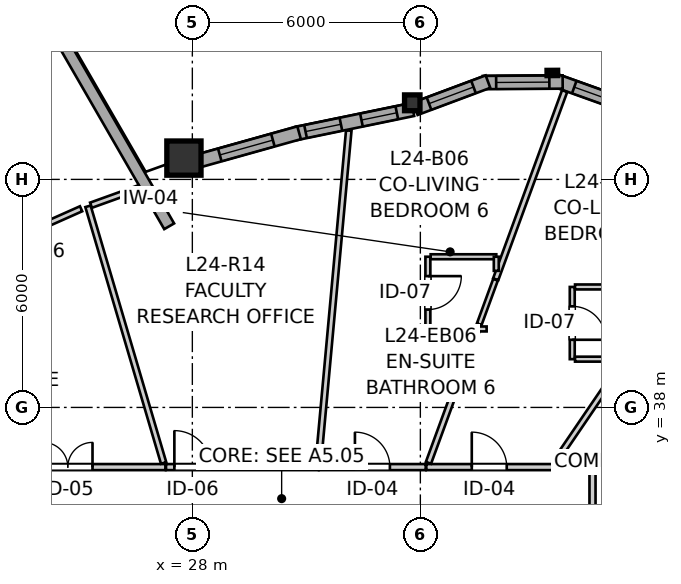
"""IFC4 building model, lengths in metres.
Left out: names, types, materials, properties, quantities, classifications, styles, units other than length and angle.
Written with IfcOpenShell. Run it as: python <this file> out.ifc"""

import sys

from ifc_helpers import new_model, si_unit, direction, frame, frame_2d, origin, origin_2d, place, context, subcontext, project, spatial, rectangle, i_section, extrude, source, transform, mapped, element, fill, save


model = new_model("IFC4")
c1 = context("Model", 3, precision=1e-05, world=origin(), true_north=direction((0.0, 1.0)))
c2 = subcontext(c1, "Body", "Model", "MODEL_VIEW")
j1 = project(units=[si_unit("LENGTHUNIT", "METRE"), si_unit("PLANEANGLEUNIT", "RADIAN")], contexts=[c1])
p1 = place(None, origin())
s1 = spatial("IfcSite", under=j1, at=p1, CompositionType="ELEMENT")
p2 = place(p1, origin())
s2 = spatial("IfcBuilding", under=s1, at=p2, CompositionType="ELEMENT")
p3 = place(p2, frame((0.0, 0.0, 83.2)))
s3 = spatial("IfcBuildingStorey", under=s2, at=p3, CompositionType="ELEMENT", Elevation=83.2)
m1 = source(origin(), c2, "Body", "SweptSolid", [
    extrude(i_section(OverallWidth=0.406, OverallDepth=0.416, WebThickness=0.027, FlangeThickness=0.044, FilletRadius=0.015, at=origin_2d()), origin(), (0.0, 0.0, 1.0), 2.935),
])
p4 = place(p3, frame((33.787, 46.015, 0.0), z_axis=(0.0, 0.0, 1.0), x_axis=(1.0, 0.0, 0.0)))
e1 = element("IfcColumn", 1, at=p4, inside=s3, PredefinedType="PILASTER", context=c2, shape_type="MappedRepresentation", body=[
    mapped(m1, transform((0.0, 0.0, 0.0), x_axis=(1.0, 0.0, 0.0), y_axis=(0.0, 1.0, 0.0), z_axis=(0.0, 0.0, 1.0), scale=1.0)),
])
m2 = source(origin(), c2, "Body", "SweptSolid", [
    extrude(rectangle(XDim=0.9, YDim=0.9, at=origin_2d()), origin(), (0.0, 0.0, 1.0), 2.935),
])
p5 = place(p3, frame((27.779, 44.561, 0.0), z_axis=(0.0, 0.0, 1.0), x_axis=(1.0, 0.0, 0.0)))
e2 = element("IfcColumn", 2, at=p5, inside=s3, PredefinedType="COLUMN", context=c2, shape_type="MappedRepresentation", body=[
    mapped(m2, transform((0.0, 0.0, 0.0), x_axis=(1.0, 0.0, 0.0), y_axis=(0.0, 1.0, 0.0), z_axis=(0.0, 0.0, 1.0), scale=1.0)),
])
p6 = place(p3, frame((39.586, 45.877, 0.0), z_axis=(0.0, 0.0, 1.0), x_axis=(-0.941473186867, 0.33708787936, 0.0)))
e3 = element("IfcWall", 3, at=p6, inside=s3, PredefinedType="SOLIDWALL", context=c2, shape_type="SweptSolid", body=[
    extrude(rectangle(XDim=2.099, YDim=0.35, at=frame_2d((1.049, 0.0))), origin(), (0.0, 0.0, 1.0), 2.465),
])
p7 = place(p6, frame((0.283, 0.0, 0.82)))
e4 = element("IfcOpeningElement", 4, at=p7, cuts=e3, PredefinedType="OPENING", context=c2, shape_type="SweptSolid", body=[
    extrude(rectangle(XDim=1.35, YDim=1.45, at=frame_2d((0.675, 0.725))), frame((0.0, 0.185, 0.0), z_axis=(0.0, -1.0, 0.0), x_axis=(1.0, 0.0, 0.0)), (0.0, 0.0, 1.0), 0.37),
])
p8 = place(p3, frame((37.744, 46.562, 0.0), z_axis=(0.0, 0.0, 1.0), x_axis=(-0.999976451414, -0.006862697526, 0.0)))
e5 = element("IfcWall", 5, at=p8, inside=s3, PredefinedType="SOLIDWALL", context=c2, shape_type="SweptSolid", body=[
    extrude(rectangle(XDim=2.099, YDim=0.35, at=frame_2d((1.049, 0.0))), origin(), (0.0, 0.0, 1.0), 2.465),
])
p9 = place(p8, frame((0.35, 0.0, 0.82)))
e6 = element("IfcOpeningElement", 6, at=p9, cuts=e5, PredefinedType="OPENING", context=c2, shape_type="SweptSolid", body=[
    extrude(rectangle(XDim=1.4, YDim=1.35, at=frame_2d((0.7, 0.675))), frame((0.0, 0.185, 0.0), z_axis=(0.0, -1.0, 0.0), x_axis=(1.0, 0.0, 0.0)), (0.0, 0.0, 1.0), 0.37),
])
p10 = place(p3, frame((35.779, 46.573, 0.0), z_axis=(0.0, 0.0, 1.0), x_axis=(-0.9368002254, -0.349864741994, 0.0)))
e7 = element("IfcWall", 7, at=p10, inside=s3, PredefinedType="SOLIDWALL", context=c2, shape_type="SweptSolid", body=[
    extrude(rectangle(XDim=2.041, YDim=0.35, at=frame_2d((1.021, 0.0))), origin(), (0.0, 0.0, 1.0), 2.465),
])
p11 = place(p10, frame((0.406, 0.0, 0.82)))
e8 = element("IfcOpeningElement", 8, at=p11, cuts=e7, PredefinedType="OPENING", context=c2, shape_type="SweptSolid", body=[
    extrude(rectangle(XDim=1.25, YDim=1.35, at=frame_2d((0.625, 0.675))), frame((0.0, 0.185, 0.0), z_axis=(0.0, -1.0, 0.0), x_axis=(1.0, 0.0, 0.0)), (0.0, 0.0, 1.0), 0.37),
])
p12 = place(p3, frame((33.803, 45.84, 0.0), z_axis=(0.0, 0.0, 1.0), x_axis=(-0.97943222174, -0.201773444777, 0.0)))
e9 = element("IfcWall", 9, at=p12, inside=s3, PredefinedType="SOLIDWALL", context=c2, shape_type="SweptSolid", body=[
    extrude(rectangle(XDim=3.144, YDim=0.35, at=frame_2d((1.572, 0.0))), origin(), (0.0, 0.0, 1.0), 2.465),
])
p13 = place(p12, frame((0.431, 0.0, 0.82)))
e10 = element("IfcOpeningElement", 10, at=p13, cuts=e9, PredefinedType="OPENING", context=c2, shape_type="SweptSolid", body=[
    extrude(rectangle(XDim=0.95, YDim=1.35, at=frame_2d((0.475, 0.675))), frame((0.0, 0.185, 0.0), z_axis=(0.0, -1.0, 0.0), x_axis=(1.0, 0.0, 0.0)), (0.0, 0.0, 1.0), 0.37),
])
p14 = place(p12, frame((1.933, 0.0, 0.82)))
e11 = element("IfcOpeningElement", 11, at=p14, cuts=e9, PredefinedType="OPENING", context=c2, shape_type="SweptSolid", body=[
    extrude(rectangle(XDim=0.95, YDim=1.35, at=frame_2d((0.475, 0.675))), frame((0.0, 0.185, 0.0), z_axis=(0.0, -1.0, 0.0), x_axis=(1.0, 0.0, 0.0)), (0.0, 0.0, 1.0), 0.37),
])
p15 = place(p3, frame((30.809, 45.227, 0.0), z_axis=(0.0, 0.0, 1.0), x_axis=(-0.963041637143, -0.269352566591, 0.0)))
e12 = element("IfcWall", 12, at=p15, inside=s3, PredefinedType="SOLIDWALL", context=c2, shape_type="SweptSolid", body=[
    extrude(rectangle(XDim=2.873, YDim=0.35, at=frame_2d((1.437, 0.0))), origin(), (0.0, 0.0, 1.0), 2.465),
])
p16 = place(p15, frame((0.717, 0.0, 0.82)))
e13 = element("IfcOpeningElement", 13, at=p16, cuts=e12, PredefinedType="OPENING", context=c2, shape_type="SweptSolid", body=[
    extrude(rectangle(XDim=1.45, YDim=1.25, at=frame_2d((0.725, 0.625))), frame((0.0, 0.185, 0.0), z_axis=(0.0, -1.0, 0.0), x_axis=(1.0, 0.0, 0.0)), (0.0, 0.0, 1.0), 0.37),
])
p17 = place(p3, frame((27.39, 42.766, 0.0), z_axis=(0.0, 0.0, 1.0), x_axis=(-0.499999403898, 0.866025747944, 0.0)))
e14 = element("IfcWall", 14, at=p17, inside=s3, PredefinedType="SOLIDWALL", context=c2, shape_type="SweptSolid", body=[
    extrude(rectangle(XDim=20.603, YDim=0.3, at=frame_2d((10.302, 0.0))), origin(), (0.0, 0.0, 1.0), 2.115),
])
p18 = place(p3, frame((22.17, 36.43, 0.0), z_axis=(0.0, 0.0, 1.0), x_axis=(1.0, 0.0, 0.0)))
e15 = element("IfcWall", 15, at=p18, inside=s3, PredefinedType="PARTITIONING", context=c2, shape_type="SweptSolid", body=[
    extrude(rectangle(XDim=5.122, YDim=0.16, at=frame_2d((2.561, 0.0))), origin(), (0.0, 0.0, 1.0), 2.573),
])
p19 = place(p18, frame((1.903, 0.0, 0.0)))
e16 = element("IfcOpeningElement", 16, at=p19, cuts=e15, PredefinedType="OPENING", context=c2, shape_type="SweptSolid", body=[
    extrude(rectangle(XDim=1.3, YDim=2.1, at=frame_2d((0.65, 1.05))), frame((0.0, 0.09, 0.0), z_axis=(0.0, -1.0, 0.0), x_axis=(1.0, 0.0, 0.0)), (0.0, 0.0, 1.0), 0.18),
])
p20 = place(p3, frame((38.53, 36.43, 0.0), z_axis=(0.0, 0.0, 1.0), x_axis=(0.0, -1.0, 0.0)))
e17 = element("IfcWall", 17, at=p20, inside=s3, PredefinedType="PARTITIONING", context=c2, shape_type="SweptSolid", body=[
    extrude(rectangle(XDim=4.559, YDim=0.16, at=frame_2d((2.279, 0.0))), origin(), (0.0, 0.0, 1.0), 2.573),
])
p21 = place(p20, frame((1.646, 0.0, 0.0)))
e18 = element("IfcOpeningElement", 18, at=p21, cuts=e17, PredefinedType="OPENING", context=c2, shape_type="SweptSolid", body=[
    extrude(rectangle(XDim=1.3, YDim=2.1, at=frame_2d((0.65, 1.05))), frame((0.0, 0.09, 0.0), z_axis=(0.0, -1.0, 0.0), x_axis=(1.0, 0.0, 0.0)), (0.0, 0.0, 1.0), 0.18),
])
p22 = place(p3, frame((27.307, 36.43, 0.0), z_axis=(0.0, 0.0, 1.0), x_axis=(1.0, 0.0, 0.0)))
e19 = element("IfcWall", 19, at=p22, inside=s3, PredefinedType="PARTITIONING", context=c2, shape_type="SweptSolid", body=[
    extrude(rectangle(XDim=4.013, YDim=0.16, at=frame_2d((2.007, 0.0))), origin(), (0.0, 0.0, 1.0), 2.935),
])
p23 = place(p22, frame((0.22, 0.0, 0.0)))
e20 = element("IfcOpeningElement", 20, at=p23, cuts=e19, PredefinedType="OPENING", context=c2, shape_type="SweptSolid", body=[
    extrude(rectangle(XDim=0.96, YDim=2.1, at=frame_2d((0.48, 1.05))), frame((0.0, 0.09, 0.0), z_axis=(0.0, -1.0, 0.0), x_axis=(1.0, 0.0, 0.0)), (0.0, 0.0, 1.0), 0.18),
])
p24 = place(p3, frame((34.156, 36.43, 0.0), z_axis=(0.0, 0.0, 1.0), x_axis=(1.0, 0.0, 0.0)))
e21 = element("IfcWall", 21, at=p24, inside=s3, PredefinedType="PARTITIONING", context=c2, shape_type="SweptSolid", body=[
    extrude(rectangle(XDim=3.316, YDim=0.16, at=frame_2d((1.658, 0.0))), origin(), (0.0, 0.0, 1.0), 2.935),
])
p25 = place(p24, frame((1.197, 0.0, 0.0)))
e22 = element("IfcOpeningElement", 22, at=p25, cuts=e21, PredefinedType="OPENING", context=c2, shape_type="SweptSolid", body=[
    extrude(rectangle(XDim=0.92, YDim=2.1, at=frame_2d((0.46, 1.05))), frame((0.0, 0.09, 0.0), z_axis=(0.0, -1.0, 0.0), x_axis=(1.0, 0.0, 0.0)), (0.0, 0.0, 1.0), 0.18),
])
p26 = place(p3, frame((22.377, 42.026, 0.0), z_axis=(0.0, 0.0, 1.0), x_axis=(0.913387960111, 0.407090204162, 0.0)))
e23 = element("IfcWall", 23, at=p26, inside=s3, PredefinedType="PARTITIONING", context=c2, shape_type="SweptSolid", body=[
    extrude(rectangle(XDim=2.951, YDim=0.145, at=frame_2d((1.475, 0.0))), origin(), (0.0, 0.0, 1.0), 2.453),
])
p27 = place(p26, frame((0.995, 0.0, 0.0)))
e24 = element("IfcOpeningElement", 24, at=p27, cuts=e23, PredefinedType="OPENING", context=c2, shape_type="SweptSolid", body=[
    extrude(rectangle(XDim=0.96, YDim=2.1, at=frame_2d((0.48, 1.05))), frame((0.0, 0.083, 0.0), z_axis=(0.0, -1.0, 0.0), x_axis=(1.0, 0.0, 0.0)), (0.0, 0.0, 1.0), 0.165),
])
p28 = place(p3, frame((31.335, 36.43, 0.0), z_axis=(0.0, 0.0, 1.0), x_axis=(1.0, 0.0, 0.0)))
e25 = element("IfcWall", 25, at=p28, inside=s3, PredefinedType="PARTITIONING", context=c2, shape_type="SweptSolid", body=[
    extrude(rectangle(XDim=2.806, YDim=0.16, at=frame_2d((1.403, 0.0))), origin(), (0.0, 0.0, 1.0), 2.935),
])
p29 = place(p28, frame((0.944, 0.0, 0.0)))
e26 = element("IfcOpeningElement", 26, at=p29, cuts=e25, PredefinedType="OPENING", context=c2, shape_type="SweptSolid", body=[
    extrude(rectangle(XDim=0.92, YDim=2.1, at=frame_2d((0.46, 1.05))), frame((0.0, 0.09, 0.0), z_axis=(0.0, -1.0, 0.0), x_axis=(1.0, 0.0, 0.0)), (0.0, 0.0, 1.0), 0.18),
])
p30 = place(p3, frame((34.198, 41.965, 0.0), z_axis=(0.0, 0.0, 1.0), x_axis=(0.0, -1.0, 0.0)))
e27 = element("IfcWall", 27, at=p30, inside=s3, PredefinedType="PARTITIONING", context=c2, shape_type="SweptSolid", body=[
    extrude(rectangle(XDim=1.827, YDim=0.13, at=frame_2d((0.914, 0.0))), origin(), (0.0, 0.0, 1.0), 2.935),
])
p31 = place(p30, frame((0.51, 0.0, 0.0)))
e28 = element("IfcOpeningElement", 28, at=p31, cuts=e27, PredefinedType="OPENING", context=c2, shape_type="SweptSolid", body=[
    extrude(rectangle(XDim=0.88, YDim=2.05, at=frame_2d((0.44, 1.025))), frame((0.0, 0.075, 0.0), z_axis=(0.0, -1.0, 0.0), x_axis=(1.0, 0.0, 0.0)), (0.0, 0.0, 1.0), 0.15),
])
p32 = place(p3, frame((37.997, 41.17, 0.0), z_axis=(0.0, 0.0, 1.0), x_axis=(0.0, -1.0, 0.0)))
e29 = element("IfcWall", 29, at=p32, inside=s3, PredefinedType="PARTITIONING", context=c2, shape_type="SweptSolid", body=[
    extrude(rectangle(XDim=1.9, YDim=0.13, at=frame_2d((0.95, 0.0))), origin(), (0.0, 0.0, 1.0), 2.935),
])
p33 = place(p32, frame((0.51, 0.0, 0.0)))
e30 = element("IfcOpeningElement", 30, at=p33, cuts=e29, PredefinedType="OPENING", context=c2, shape_type="SweptSolid", body=[
    extrude(rectangle(XDim=0.88, YDim=2.05, at=frame_2d((0.44, 1.025))), frame((0.0, 0.075, 0.0), z_axis=(0.0, -1.0, 0.0), x_axis=(1.0, 0.0, 0.0)), (0.0, 0.0, 1.0), 0.15),
])
p34 = place(p3, frame((31.314, 36.525, 0.0), z_axis=(0.0, 0.0, 1.0), x_axis=(0.091226381691, 0.995830179942, 0.0)))
e31 = element("IfcWall", 31, at=p34, inside=s3, PredefinedType="PARTITIONING", context=c2, shape_type="SweptSolid", body=[
    extrude(rectangle(XDim=8.797, YDim=0.145, at=frame_2d((4.398, 0.0))), origin(), (0.0, 0.0, 1.0), 2.935),
])
p35 = place(p3, frame((25.254, 43.292, 0.0), z_axis=(0.0, 0.0, 1.0), x_axis=(0.282661880608, -0.959219610543, 0.0)))
e32 = element("IfcWall", 32, at=p35, inside=s3, PredefinedType="PARTITIONING", context=c2, shape_type="SweptSolid", body=[
    extrude(rectangle(XDim=7.041, YDim=0.145, at=frame_2d((3.521, 0.0))), origin(), (0.0, 0.0, 1.0), 2.935),
])
p36 = place(p3, frame((38.659, 31.93, 0.0), z_axis=(0.0, 0.0, 1.0), x_axis=(0.813936175568, 0.580954302938, 0.0)))
e33 = element("IfcWall", 33, at=p36, inside=s3, PredefinedType="PARTITIONING", context=c2, shape_type="SweptSolid", body=[
    extrude(rectangle(XDim=6.346, YDim=0.145, at=frame_2d((3.173, 0.0))), origin(), (0.0, 0.0, 1.0), 2.935),
])
p37 = place(p3, frame((35.983, 41.373, 0.0), z_axis=(0.0, 0.0, 1.0), x_axis=(0.343972978133, 0.938979547335, 0.0)))
e34 = element("IfcWall", 34, at=p37, inside=s3, PredefinedType="PARTITIONING", context=c2, shape_type="SweptSolid", body=[
    extrude(rectangle(XDim=5.272, YDim=0.145, at=frame_2d((2.636, 0.0))), origin(), (0.0, 0.0, 1.0), 2.935),
])
p38 = place(p3, frame((34.213, 36.542, 0.0), z_axis=(0.0, 0.0, 1.0), x_axis=(0.343978558693, 0.93897750301, 0.0)))
e35 = element("IfcWall", 35, at=p38, inside=s3, PredefinedType="PARTITIONING", context=c2, shape_type="SweptSolid", body=[
    extrude(rectangle(XDim=3.664, YDim=0.145, at=frame_2d((1.832, 0.0))), origin(), (0.0, 0.0, 1.0), 2.935),
])
p39 = place(p3, frame((37.541, 36.557, 0.0), z_axis=(0.0, 0.0, 1.0), x_axis=(0.563020017907, 0.826443258449, 0.0)))
e36 = element("IfcWall", 36, at=p39, inside=s3, PredefinedType="PARTITIONING", context=c2, shape_type="SweptSolid", body=[
    extrude(rectangle(XDim=3.3, YDim=0.145, at=frame_2d((1.65, 0.0))), origin(), (0.0, 0.0, 1.0), 2.935),
])
p40 = place(p3, frame((38.07, 41.17, 0.0), z_axis=(0.0, 0.0, 1.0), x_axis=(1.0, 0.0, 0.0)))
e37 = element("IfcWall", 37, at=p40, inside=s3, PredefinedType="PARTITIONING", context=c2, shape_type="SweptSolid", body=[
    extrude(rectangle(XDim=1.727, YDim=0.13, at=frame_2d((0.864, 0.0))), origin(), (0.0, 0.0, 1.0), 2.935),
])
p41 = place(p3, frame((34.271, 41.965, 0.0), z_axis=(0.0, 0.0, 1.0), x_axis=(1.0, 0.0, 0.0)))
e38 = element("IfcWall", 38, at=p41, inside=s3, PredefinedType="PARTITIONING", context=c2, shape_type="SweptSolid", body=[
    extrude(rectangle(XDim=1.727, YDim=0.13, at=frame_2d((0.864, 0.0))), origin(), (0.0, 0.0, 1.0), 2.103),
])
p42 = place(p3, frame((38.07, 39.27, 0.0), z_axis=(0.0, 0.0, 1.0), x_axis=(1.0, 0.0, 0.0)))
e39 = element("IfcWall", 39, at=p42, inside=s3, PredefinedType="PARTITIONING", context=c2, shape_type="SweptSolid", body=[
    extrude(rectangle(XDim=1.179, YDim=0.13, at=frame_2d((0.589, 0.0))), origin(), (0.0, 0.0, 1.0), 2.935),
])
p43 = place(p3, frame((35.549, 40.189, 0.0), z_axis=(0.0, 0.0, 1.0), x_axis=(0.344070409158, 0.938943850048, 0.0)))
e40 = element("IfcWall", 40, at=p43, inside=s3, PredefinedType="PARTITIONING", context=c2, shape_type="SweptSolid", body=[
    extrude(rectangle(XDim=1.246, YDim=0.13, at=frame_2d((0.623, 0.0))), origin(), (0.0, 0.0, 1.0), 2.935),
])
p44 = place(p3, frame((25.334, 43.321, 0.0), z_axis=(0.0, 0.0, 1.0), x_axis=(0.940956330278, 0.3385279671, 0.0)))
e41 = element("IfcWall", 41, at=p44, inside=s3, PredefinedType="PARTITIONING", context=c2, shape_type="SweptSolid", body=[
    extrude(rectangle(XDim=1.354, YDim=0.145, at=frame_2d((0.677, 0.0))), origin(), (0.0, 0.0, 1.0), 2.453),
])
p45 = place(p3, frame((33.958, 40.065, 0.0), z_axis=(0.0, 0.0, 1.0), x_axis=(1.0, 0.0, 0.0)))
e42 = element("IfcWall", 42, at=p45, inside=s3, PredefinedType="PARTITIONING", context=c2, shape_type="SweptSolid", body=[
    extrude(rectangle(XDim=1.786, YDim=0.13, at=frame_2d((0.893, 0.0))), origin(), (0.0, 0.0, 1.0), 2.935),
])
p46 = place(p3, frame((37.637, 36.43, 0.0), z_axis=(0.0, 0.0, 1.0), x_axis=(1.0, 0.0, 0.0)))
e43 = element("IfcWall", 43, at=p46, inside=s3, PredefinedType="PARTITIONING", context=c2, shape_type="SweptSolid", body=[
    extrude(rectangle(XDim=0.805, YDim=0.16, at=frame_2d((0.402, 0.0))), origin(), (0.0, 0.0, 1.0), 2.935),
])
p47 = place(p3, frame((35.998, 41.594, 0.0), z_axis=(0.0, 0.0, 1.0), x_axis=(0.0, 1.0, 0.0)))
e44 = element("IfcWall", 44, at=p47, inside=s3, PredefinedType="PARTITIONING", context=c2, shape_type="SweptSolid", body=[
    extrude(rectangle(XDim=0.371, YDim=0.13, at=frame_2d((0.186, 0.0))), origin(), (0.0, 0.0, 1.0), 2.935),
])
m3 = source(origin(), c2, "Body", "SweptSolid", [
    extrude(rectangle(XDim=1.35, YDim=1.45, at=frame_2d((0.675, 0.725))), frame((0.0, 0.03, 0.0), z_axis=(0.0, -1.0, 0.0), x_axis=(1.0, 0.0, 0.0)), (0.0, 0.0, 1.0), 0.06),
])
p48 = place(p7, origin())
e45 = element("IfcWindow", 45, at=p48, inside=s3, PartitioningType="SINGLE_PANEL", PredefinedType="WINDOW", context=c2, shape_type="MappedRepresentation", body=[
    mapped(m3, transform((0.0, 0.0, 0.0), x_axis=(1.0, 0.0, 0.0), y_axis=(0.0, 1.0, 0.0), z_axis=(0.0, 0.0, 1.0), scale=1.0)),
])
fill(e4, e45)
m4 = source(origin(), c2, "Body", "SweptSolid", [
    extrude(rectangle(XDim=1.4, YDim=1.35, at=frame_2d((0.7, 0.675))), frame((0.0, 0.03, 0.0), z_axis=(0.0, -1.0, 0.0), x_axis=(1.0, 0.0, 0.0)), (0.0, 0.0, 1.0), 0.06),
])
p49 = place(p9, origin())
e46 = element("IfcWindow", 46, at=p49, inside=s3, PartitioningType="SINGLE_PANEL", PredefinedType="WINDOW", context=c2, shape_type="MappedRepresentation", body=[
    mapped(m4, transform((0.0, 0.0, 0.0), x_axis=(1.0, 0.0, 0.0), y_axis=(0.0, 1.0, 0.0), z_axis=(0.0, 0.0, 1.0), scale=1.0)),
])
fill(e6, e46)
m5 = source(origin(), c2, "Body", "SweptSolid", [
    extrude(rectangle(XDim=1.25, YDim=1.35, at=frame_2d((0.625, 0.675))), frame((0.0, 0.03, 0.0), z_axis=(0.0, -1.0, 0.0), x_axis=(1.0, 0.0, 0.0)), (0.0, 0.0, 1.0), 0.06),
])
p50 = place(p11, origin())
e47 = element("IfcWindow", 47, at=p50, inside=s3, PartitioningType="SINGLE_PANEL", PredefinedType="WINDOW", context=c2, shape_type="MappedRepresentation", body=[
    mapped(m5, transform((0.0, 0.0, 0.0), x_axis=(1.0, 0.0, 0.0), y_axis=(0.0, 1.0, 0.0), z_axis=(0.0, 0.0, 1.0), scale=1.0)),
])
fill(e8, e47)
m6 = source(origin(), c2, "Body", "SweptSolid", [
    extrude(rectangle(XDim=0.95, YDim=1.35, at=frame_2d((0.475, 0.675))), frame((0.0, 0.03, 0.0), z_axis=(0.0, -1.0, 0.0), x_axis=(1.0, 0.0, 0.0)), (0.0, 0.0, 1.0), 0.06),
])
p51 = place(p13, origin())
e48 = element("IfcWindow", 48, at=p51, inside=s3, PartitioningType="SINGLE_PANEL", PredefinedType="WINDOW", context=c2, shape_type="MappedRepresentation", body=[
    mapped(m6, transform((0.0, 0.0, 0.0), x_axis=(1.0, 0.0, 0.0), y_axis=(0.0, 1.0, 0.0), z_axis=(0.0, 0.0, 1.0), scale=1.0)),
])
fill(e10, e48)
p52 = place(p14, origin())
e49 = element("IfcWindow", 49, at=p52, inside=s3, PartitioningType="SINGLE_PANEL", PredefinedType="WINDOW", context=c2, shape_type="MappedRepresentation", body=[
    mapped(m6, transform((0.0, 0.0, 0.0), x_axis=(1.0, 0.0, 0.0), y_axis=(0.0, 1.0, 0.0), z_axis=(0.0, 0.0, 1.0), scale=1.0)),
])
fill(e11, e49)
m7 = source(origin(), c2, "Body", "SweptSolid", [
    extrude(rectangle(XDim=1.45, YDim=1.25, at=frame_2d((0.725, 0.625))), frame((0.0, 0.03, 0.0), z_axis=(0.0, -1.0, 0.0), x_axis=(1.0, 0.0, 0.0)), (0.0, 0.0, 1.0), 0.06),
])
p53 = place(p16, origin())
e50 = element("IfcWindow", 50, at=p53, inside=s3, PartitioningType="SINGLE_PANEL", PredefinedType="WINDOW", context=c2, shape_type="MappedRepresentation", body=[
    mapped(m7, transform((0.0, 0.0, 0.0), x_axis=(1.0, 0.0, 0.0), y_axis=(0.0, 1.0, 0.0), z_axis=(0.0, 0.0, 1.0), scale=1.0)),
])
fill(e13, e50)
m8 = source(origin(), c2, "Body", "SweptSolid", [
    extrude(rectangle(XDim=1.3, YDim=2.1, at=frame_2d((0.65, 1.05))), frame((0.0, 0.025, 0.0), z_axis=(0.0, -1.0, 0.0), x_axis=(1.0, 0.0, 0.0)), (0.0, 0.0, 1.0), 0.05),
])
p54 = place(p19, origin())
e51 = element("IfcDoor", 51, at=p54, inside=s3, OperationType="DOUBLE_DOOR_SINGLE_SWING", PredefinedType="DOOR", context=c2, shape_type="MappedRepresentation", body=[
    mapped(m8, transform((0.0, 0.0, 0.0), x_axis=(1.0, 0.0, 0.0), y_axis=(0.0, 1.0, 0.0), z_axis=(0.0, 0.0, 1.0), scale=1.0)),
])
fill(e16, e51)
m9 = source(origin(), c2, "Body", "SweptSolid", [
    extrude(rectangle(XDim=0.96, YDim=2.1, at=frame_2d((0.48, 1.05))), frame((0.0, 0.025, 0.0), z_axis=(0.0, -1.0, 0.0), x_axis=(1.0, 0.0, 0.0)), (0.0, 0.0, 1.0), 0.05),
])
p55 = place(p23, origin())
e52 = element("IfcDoor", 52, at=p55, inside=s3, OperationType="SINGLE_SWING_LEFT", PredefinedType="DOOR", context=c2, shape_type="MappedRepresentation", body=[
    mapped(m9, transform((0.0, 0.0, 0.0), x_axis=(1.0, 0.0, 0.0), y_axis=(0.0, 1.0, 0.0), z_axis=(0.0, 0.0, 1.0), scale=1.0)),
])
fill(e20, e52)
m10 = source(origin(), c2, "Body", "SweptSolid", [
    extrude(rectangle(XDim=0.92, YDim=2.1, at=frame_2d((0.46, 1.05))), frame((0.0, 0.025, 0.0), z_axis=(0.0, -1.0, 0.0), x_axis=(1.0, 0.0, 0.0)), (0.0, 0.0, 1.0), 0.05),
])
p56 = place(p25, origin())
e53 = element("IfcDoor", 53, at=p56, inside=s3, OperationType="SINGLE_SWING_LEFT", PredefinedType="DOOR", context=c2, shape_type="MappedRepresentation", body=[
    mapped(m10, transform((0.0, 0.0, 0.0), x_axis=(1.0, 0.0, 0.0), y_axis=(0.0, 1.0, 0.0), z_axis=(0.0, 0.0, 1.0), scale=1.0)),
])
fill(e22, e53)
p57 = place(p29, origin())
e54 = element("IfcDoor", 54, at=p57, inside=s3, OperationType="SINGLE_SWING_LEFT", PredefinedType="DOOR", context=c2, shape_type="MappedRepresentation", body=[
    mapped(m10, transform((0.0, 0.0, 0.0), x_axis=(1.0, 0.0, 0.0), y_axis=(0.0, 1.0, 0.0), z_axis=(0.0, 0.0, 1.0), scale=1.0)),
])
fill(e26, e54)
m11 = source(origin(), c2, "Body", "SweptSolid", [
    extrude(rectangle(XDim=0.88, YDim=2.05, at=frame_2d((0.44, 1.025))), frame((0.0, 0.025, 0.0), z_axis=(0.0, -1.0, 0.0), x_axis=(1.0, 0.0, 0.0)), (0.0, 0.0, 1.0), 0.05),
])
p58 = place(p31, origin())
e55 = element("IfcDoor", 55, at=p58, inside=s3, OperationType="SINGLE_SWING_LEFT", PredefinedType="DOOR", context=c2, shape_type="MappedRepresentation", body=[
    mapped(m11, transform((0.0, 0.0, 0.0), x_axis=(1.0, 0.0, 0.0), y_axis=(0.0, 1.0, 0.0), z_axis=(0.0, 0.0, 1.0), scale=1.0)),
])
fill(e28, e55)
p59 = place(p33, origin())
e56 = element("IfcDoor", 56, at=p59, inside=s3, OperationType="SINGLE_SWING_RIGHT", PredefinedType="DOOR", context=c2, shape_type="MappedRepresentation", body=[
    mapped(m11, transform((0.0, 0.0, 0.0), x_axis=(1.0, 0.0, 0.0), y_axis=(0.0, 1.0, 0.0), z_axis=(0.0, 0.0, 1.0), scale=1.0)),
])
fill(e30, e56)
save(model, sys.argv[1])
